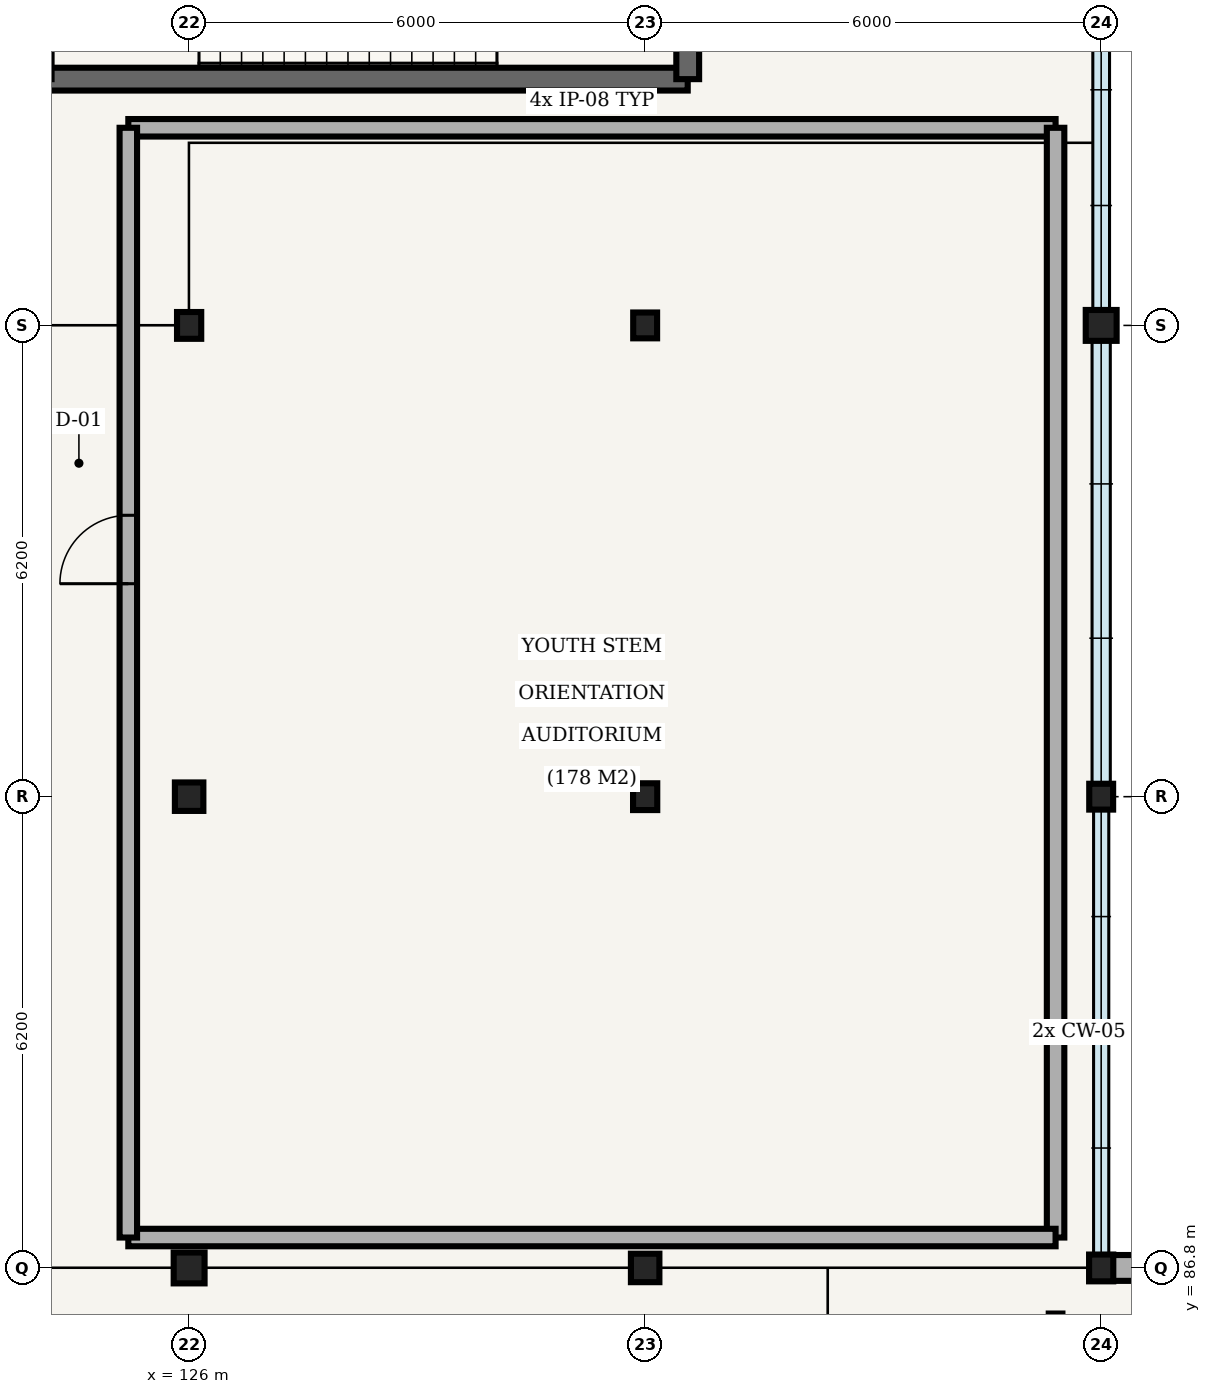
"""IFC4 building model, lengths in metres.
Left out: names, types, materials, properties, quantities, classifications, styles, units other than length and angle.
Written with IfcOpenShell. Run it as: python <this file> out.ifc"""

import sys

from ifc_helpers import new_model, si_unit, direction, frame, frame_2d, origin, origin_2d, place, context, subcontext, project, spatial, rectangle, hollow_circle, i_section, extrude, element, fill, save


model = new_model("IFC4")
c1 = context("Model", 3, precision=1e-05, world=origin(), true_north=direction((0.0, 1.0)))
c2 = subcontext(c1, "Body", "Model", "MODEL_VIEW")
j1 = project(units=[si_unit("LENGTHUNIT", "METRE"), si_unit("PLANEANGLEUNIT", "RADIAN")], contexts=[c1])
p1 = place(None, origin())
s1 = spatial("IfcSite", under=j1, at=p1, CompositionType="ELEMENT")
p2 = place(p1, origin())
s2 = spatial("IfcBuilding", under=s1, at=p2, CompositionType="ELEMENT")
p3 = place(p2, origin())
s3 = spatial("IfcBuildingStorey", under=s2, at=p3, CompositionType="ELEMENT", Elevation=0.0)
p4 = place(p3, frame((126.0, 86.8, -5.8), z_axis=(0.0, 0.0, 1.0), x_axis=(1.0, 0.0, 0.0)))
e1 = element("IfcColumn", 1, at=p4, inside=s3, PredefinedType="COLUMN", context=c2, shape_type="SweptSolid", body=[
    extrude(hollow_circle(Radius=0.203, WallThickness=0.016, at=origin_2d()), origin(), (0.0, 0.0, 1.0), 11.2),
])
p5 = place(p3, frame((126.0, 93.0, -5.8), z_axis=(0.0, 0.0, 1.0), x_axis=(1.0, 0.0, 0.0)))
e2 = element("IfcColumn", 2, at=p5, inside=s3, PredefinedType="COLUMN", context=c2, shape_type="SweptSolid", body=[
    extrude(i_section(OverallWidth=0.375, OverallDepth=0.375, WebThickness=0.017, FlangeThickness=0.027, FilletRadius=0.015, at=origin_2d()), origin(), (0.0, 0.0, 1.0), 11.2),
])
p6 = place(p3, frame((126.0, 99.2, -5.8), z_axis=(0.0, 0.0, 1.0), x_axis=(1.0, 0.0, 0.0)))
e3 = element("IfcColumn", 3, at=p6, inside=s3, PredefinedType="COLUMN", context=c2, shape_type="SweptSolid", body=[
    extrude(i_section(OverallWidth=0.318, OverallDepth=0.353, WebThickness=0.023, FlangeThickness=0.038, FilletRadius=0.015, at=origin_2d()), origin(), (0.0, 0.0, 1.0), 11.2),
])
p7 = place(p3, frame((132.0, 86.8, -5.8), z_axis=(0.0, 0.0, 1.0), x_axis=(1.0, 0.0, 0.0)))
e4 = element("IfcColumn", 4, at=p7, inside=s3, PredefinedType="COLUMN", context=c2, shape_type="SweptSolid", body=[
    extrude(i_section(OverallWidth=0.375, OverallDepth=0.375, WebThickness=0.017, FlangeThickness=0.027, FilletRadius=0.015, at=origin_2d()), origin(), (0.0, 0.0, 1.0), 11.2),
])
p8 = place(p3, frame((132.0, 93.0, -5.8), z_axis=(0.0, 0.0, 1.0), x_axis=(1.0, 0.0, 0.0)))
e5 = element("IfcColumn", 5, at=p8, inside=s3, PredefinedType="COLUMN", context=c2, shape_type="SweptSolid", body=[
    extrude(i_section(OverallWidth=0.318, OverallDepth=0.353, WebThickness=0.023, FlangeThickness=0.038, FilletRadius=0.015, at=origin_2d()), origin(), (0.0, 0.0, 1.0), 11.2),
])
p9 = place(p3, frame((132.0, 99.2, -5.8), z_axis=(0.0, 0.0, 1.0), x_axis=(1.0, 0.0, 0.0)))
e6 = element("IfcColumn", 6, at=p9, inside=s3, PredefinedType="COLUMN", context=c2, shape_type="SweptSolid", body=[
    extrude(i_section(OverallWidth=0.314, OverallDepth=0.34, WebThickness=0.019, FlangeThickness=0.031, FilletRadius=0.015, at=origin_2d()), origin(), (0.0, 0.0, 1.0), 11.2),
])
p10 = place(p3, frame((138.0, 86.8, -5.8), z_axis=(0.0, 0.0, 1.0), x_axis=(1.0, 0.0, 0.0)))
e7 = element("IfcColumn", 7, at=p10, inside=s3, PredefinedType="COLUMN", context=c2, shape_type="SweptSolid", body=[
    extrude(i_section(OverallWidth=0.318, OverallDepth=0.353, WebThickness=0.023, FlangeThickness=0.038, FilletRadius=0.015, at=origin_2d()), origin(), (0.0, 0.0, 1.0), 11.2),
])
p11 = place(p3, frame((138.0, 93.0, -5.8), z_axis=(0.0, 0.0, 1.0), x_axis=(1.0, 0.0, 0.0)))
e8 = element("IfcColumn", 8, at=p11, inside=s3, PredefinedType="COLUMN", context=c2, shape_type="SweptSolid", body=[
    extrude(i_section(OverallWidth=0.314, OverallDepth=0.34, WebThickness=0.019, FlangeThickness=0.031, FilletRadius=0.015, at=origin_2d()), origin(), (0.0, 0.0, 1.0), 11.2),
])
p12 = place(p3, frame((138.0, 99.2, -5.8), z_axis=(0.0, 0.0, 1.0), x_axis=(1.0, 0.0, 0.0)))
e9 = element("IfcColumn", 9, at=p12, inside=s3, PredefinedType="COLUMN", context=c2, shape_type="SweptSolid", body=[
    extrude(hollow_circle(Radius=0.203, WallThickness=0.016, at=origin_2d()), origin(), (0.0, 0.0, 1.0), 11.2),
])
p13 = place(p3, frame((144.075, 86.8, 0.0), z_axis=(0.0, 0.0, 1.0), x_axis=(-1.0, 0.0, 0.0)))
e10 = element("IfcWall", 10, at=p13, inside=s3, PredefinedType="SOLIDWALL", context=c2, shape_type="SweptSolid", body=[
    extrude(rectangle(XDim=6.15, YDim=0.34, at=frame_2d((3.075, 0.0))), origin(), (0.0, 0.0, 1.0), 4.44),
])
p14 = place(p13, frame((2.525, 0.0, 0.9)))
e11 = element("IfcOpeningElement", 11, at=p14, cuts=e10, PredefinedType="OPENING", context=c2, shape_type="SweptSolid", body=[
    extrude(rectangle(XDim=1.1, YDim=1.5, at=frame_2d((0.55, 0.75))), frame((0.0, 0.18, 0.0), z_axis=(0.0, -1.0, 0.0), x_axis=(1.0, 0.0, 0.0)), (0.0, 0.0, 1.0), 0.36),
])
p15 = place(p3, frame((124.04, 102.44, 0.0), z_axis=(0.0, 0.0, 1.0), x_axis=(1.0, 0.0, 0.0)))
e12 = element("IfcWall", 12, at=p15, inside=s3, PredefinedType="SHEAR", context=c2, shape_type="SweptSolid", body=[
    extrude(rectangle(XDim=8.52, YDim=0.3, at=frame_2d((4.26, 0.0))), origin(), (0.0, 0.0, 1.0), 5.15),
])
p16 = place(p3, frame((132.56, 102.44, 0.0), z_axis=(0.0, 0.0, 1.0), x_axis=(0.0, 1.0, 0.0)))
e13 = element("IfcWall", 13, at=p16, inside=s3, PredefinedType="SHEAR", context=c2, shape_type="SweptSolid", body=[
    extrude(rectangle(XDim=4.33, YDim=0.3, at=frame_2d((2.165, 0.0))), origin(), (0.0, 0.0, 1.0), 5.15),
])
p17 = place(p3, frame((125.2, 101.8, 0.0), z_axis=(0.0, 0.0, 1.0), x_axis=(1.0, 0.0, 0.0)))
e14 = element("IfcWall", 14, at=p17, inside=s3, PredefinedType="PARTITIONING", context=c2, shape_type="SweptSolid", body=[
    extrude(rectangle(XDim=12.2, YDim=0.23, at=frame_2d((6.1, 0.0))), origin(), (0.0, 0.0, 1.0), 4.35),
])
p18 = place(p3, frame((137.4, 101.8, 0.0), z_axis=(0.0, 0.0, 1.0), x_axis=(0.0, -1.0, 0.0)))
e15 = element("IfcWall", 15, at=p18, inside=s3, PredefinedType="PARTITIONING", context=c2, shape_type="SweptSolid", body=[
    extrude(rectangle(XDim=14.6, YDim=0.23, at=frame_2d((7.3, 0.0))), origin(), (0.0, 0.0, 1.0), 4.35),
])
p19 = place(p3, frame((137.4, 87.2, 0.0), z_axis=(0.0, 0.0, 1.0), x_axis=(-1.0, 0.0, 0.0)))
e16 = element("IfcWall", 16, at=p19, inside=s3, PredefinedType="PARTITIONING", context=c2, shape_type="SweptSolid", body=[
    extrude(rectangle(XDim=12.2, YDim=0.23, at=frame_2d((6.1, 0.0))), origin(), (0.0, 0.0, 1.0), 4.35),
])
p20 = place(p3, frame((125.2, 87.2, 0.0), z_axis=(0.0, 0.0, 1.0), x_axis=(0.0, 1.0, 0.0)))
e17 = element("IfcWall", 17, at=p20, inside=s3, PredefinedType="PARTITIONING", context=c2, shape_type="SweptSolid", body=[
    extrude(rectangle(XDim=14.6, YDim=0.23, at=frame_2d((7.3, 0.0))), origin(), (0.0, 0.0, 1.0), 4.35),
])
p21 = place(p20, frame((8.602, 0.0, 0.0)))
e18 = element("IfcOpeningElement", 18, at=p21, cuts=e17, PredefinedType="OPENING", context=c2, shape_type="SweptSolid", body=[
    extrude(rectangle(XDim=0.9, YDim=2.1, at=frame_2d((0.45, 1.05))), frame((0.0, 0.125, 0.0), z_axis=(0.0, -1.0, 0.0), x_axis=(1.0, 0.0, 0.0)), (0.0, 0.0, 1.0), 0.25),
])
p22 = place(p21, origin())
e19 = element("IfcDoor", 19, at=p22, inside=s3, OperationType="SINGLE_SWING_LEFT", PredefinedType="DOOR", context=c2, shape_type="SweptSolid", body=[
    extrude(rectangle(XDim=0.9, YDim=2.1, at=frame_2d((0.45, 1.05))), frame((0.0, 0.025, 0.0), z_axis=(0.0, -1.0, 0.0), x_axis=(1.0, 0.0, 0.0)), (0.0, 0.0, 1.0), 0.05),
])
fill(e18, e19)
save(model, sys.argv[1])
